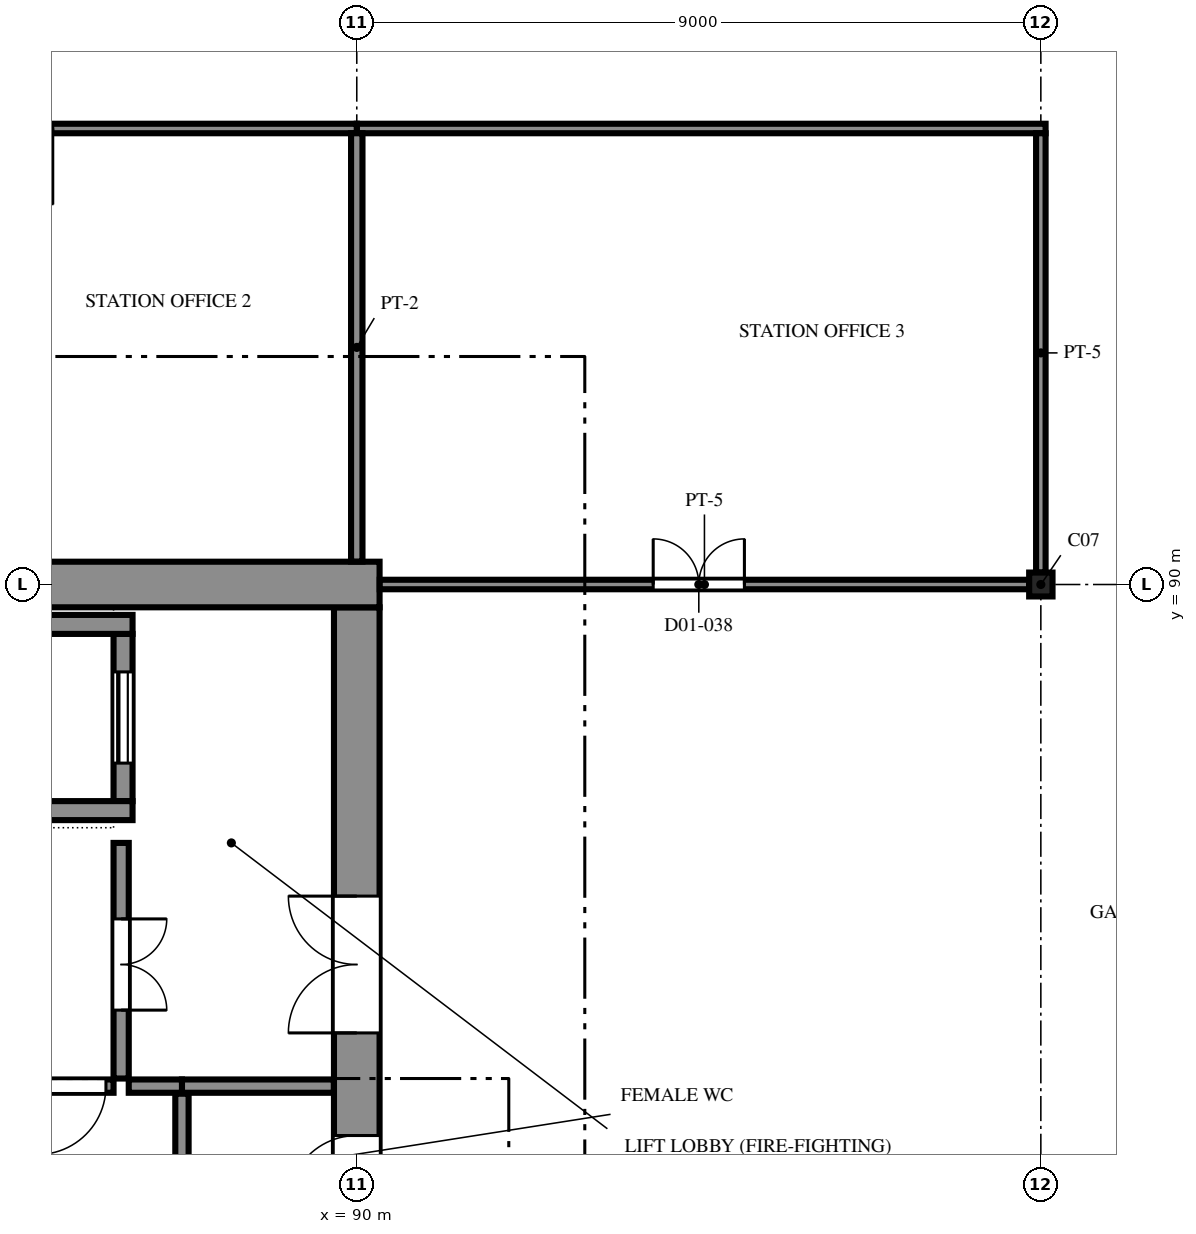
"""IFC4 building model, lengths in metres.
Left out: names, types, materials, properties, quantities, classifications, styles, units other than length and angle.
Written with IfcOpenShell. Run it as: python <this file> out.ifc"""

import sys

from ifc_helpers import new_model, si_unit, direction, frame, frame_2d, origin, origin_2d, place, context, subcontext, project, spatial, polyline, rectangle, i_section, outline, extrude, element, fill, save


model = new_model("IFC4")
c1 = context("Model", 3, precision=1e-05, world=origin(), true_north=direction((0.0, 1.0)))
c2 = subcontext(c1, "Body", "Model", "MODEL_VIEW")
j1 = project(units=[si_unit("LENGTHUNIT", "METRE"), si_unit("PLANEANGLEUNIT", "RADIAN")], contexts=[c1])
p1 = place(None, origin())
s1 = spatial("IfcSite", under=j1, at=p1, CompositionType="ELEMENT")
p2 = place(p1, origin())
s2 = spatial("IfcBuilding", under=s1, at=p2, CompositionType="ELEMENT")
p3 = place(p2, frame((0.0, 0.0, 7.5)))
s3 = spatial("IfcBuildingStorey", under=s2, at=p3, CompositionType="ELEMENT", Elevation=7.5)
p4 = place(p3, frame((99.0, 90.0, 0.0), z_axis=(0.0, 0.0, 1.0), x_axis=(1.0, 0.0, 0.0)))
e1 = element("IfcColumn", 1, at=p4, inside=s3, PredefinedType="COLUMN", context=c2, shape_type="SweptSolid", body=[
    extrude(i_section(OverallWidth=0.307, OverallDepth=0.314, WebThickness=0.012, FlangeThickness=0.019, FilletRadius=0.015, at=origin_2d()), origin(), (0.0, 0.0, 1.0), 4.2),
])
p5 = place(p3, frame((71.7, 90.0, 0.0), z_axis=(0.0, 0.0, 1.0), x_axis=(1.0, 0.0, 0.0)))
e2 = element("IfcWall", 2, at=p5, inside=s3, PredefinedType="SOLIDWALL", context=c2, shape_type="SweptSolid", body=[
    extrude(rectangle(XDim=18.6, YDim=0.6, at=frame_2d((9.3, 0.0))), origin(), (0.0, 0.0, 1.0), 4.2),
])
p6 = place(p3, frame((90.0, 81.3, 0.0), z_axis=(0.0, 0.0, 1.0), x_axis=(0.0, 1.0, 0.0)))
e3 = element("IfcWall", 3, at=p6, inside=s3, PredefinedType="SOLIDWALL", context=c2, shape_type="SweptSolid", body=[
    extrude(rectangle(XDim=8.4, YDim=0.6, at=frame_2d((4.2, 0.0))), origin(), (0.0, 0.0, 1.0), 4.2),
])
p7 = place(p6, frame((2.8, 0.0, 0.0)))
e4 = element("IfcOpeningElement", 4, at=p7, cuts=e3, PredefinedType="OPENING", context=c2, shape_type="SweptSolid", body=[
    extrude(rectangle(XDim=1.8, YDim=2.1, at=frame_2d((0.9, 1.05))), frame((0.0, 0.31, 0.0), z_axis=(0.0, -1.0, 0.0), x_axis=(1.0, 0.0, 0.0)), (0.0, 0.0, 1.0), 0.62),
])
p8 = place(p6, frame((0.55, 0.0, 0.0)))
e5 = element("IfcOpeningElement", 5, at=p8, cuts=e3, PredefinedType="OPENING", context=c2, shape_type="SweptSolid", body=[
    extrude(rectangle(XDim=0.9, YDim=2.1, at=frame_2d((0.45, 1.05))), frame((0.0, 0.31, 0.0), z_axis=(0.0, -1.0, 0.0), x_axis=(1.0, 0.0, 0.0)), (0.0, 0.0, 1.0), 0.62),
])
for number, where, z_axis, x_axis in (
    (6, (83.65, 87.025, 0.0), (0.0, 0.0, 1.0), (1.0, 0.0, 0.0)),
    (7, (83.65, 89.475, 0.0), (0.0, 0.0, 1.0), (1.0, 0.0, 0.0)),
):
    element("IfcWall", number, at=place(p3, frame(where, z_axis=z_axis, x_axis=x_axis)), inside=s3, PredefinedType="SOLIDWALL", context=c2, shape_type="SweptSolid", body=[
        extrude(rectangle(XDim=3.4, YDim=0.25, at=frame_2d((1.7, 0.0))), origin(), (0.0, 0.0, 1.0), 3.516),
    ])
p9 = place(p3, frame((86.925, 87.15, 0.0), z_axis=(0.0, 0.0, 1.0), x_axis=(0.0, 1.0, 0.0)))
e8 = element("IfcWall", 8, at=p9, inside=s3, PredefinedType="SOLIDWALL", context=c2, shape_type="SweptSolid", body=[
    extrude(rectangle(XDim=2.2, YDim=0.25, at=frame_2d((1.1, 0.0))), origin(), (0.0, 0.0, 1.0), 3.516),
])
p10 = place(p9, frame((0.5, 0.0, 0.0)))
e9 = element("IfcOpeningElement", 9, at=p10, cuts=e8, PredefinedType="OPENING", context=c2, shape_type="SweptSolid", body=[
    extrude(rectangle(XDim=1.2, YDim=2.1, at=frame_2d((0.6, 1.05))), frame((0.0, 0.135, 0.0), z_axis=(0.0, -1.0, 0.0), x_axis=(1.0, 0.0, 0.0)), (0.0, 0.0, 1.0), 0.27),
])
p11 = place(p3, frame((99.062, 96.0, 0.0), z_axis=(0.0, 0.0, 1.0), x_axis=(-1.0, 0.0, 0.0)))
e10 = element("IfcWall", 10, at=p11, inside=s3, PredefinedType="PARTITIONING", context=c2, shape_type="SweptSolid", body=[
    extrude(rectangle(XDim=9.062, YDim=0.125, at=frame_2d((4.531, 0.0))), origin(), (0.0, 0.0, 1.0), 3.307),
])
p12 = place(p3, frame((90.0, 96.0, 0.0), z_axis=(0.0, 0.0, 1.0), x_axis=(-1.0, 0.0, 0.0)))
e11 = element("IfcWall", 11, at=p12, inside=s3, PredefinedType="PARTITIONING", context=c2, shape_type="SweptSolid", body=[
    extrude(rectangle(XDim=9.0, YDim=0.125, at=frame_2d((4.5, 0.0))), origin(), (0.0, 0.0, 1.0), 3.307),
])
p13 = place(p12, frame((4.0, 0.0, 0.0)))
e12 = element("IfcOpeningElement", 12, at=p13, cuts=e11, PredefinedType="OPENING", context=c2, shape_type="SweptSolid", body=[
    extrude(rectangle(XDim=1.0, YDim=2.1, at=frame_2d((0.5, 1.05))), frame((0.0, 0.073, 0.0), z_axis=(0.0, -1.0, 0.0), x_axis=(1.0, 0.0, 0.0)), (0.0, 0.0, 1.0), 0.145),
])
p14 = place(p3, frame((90.302, 90.0, 0.0), z_axis=(0.0, 0.0, 1.0), x_axis=(1.0, 0.0, 0.0)))
e13 = element("IfcWall", 13, at=p14, inside=s3, PredefinedType="PARTITIONING", context=c2, shape_type="SweptSolid", body=[
    extrude(rectangle(XDim=8.544, YDim=0.125, at=frame_2d((4.272, 0.0))), origin(), (0.0, 0.0, 1.0), 3.307),
])
p15 = place(p14, frame((3.598, 0.0, 0.0)))
e14 = element("IfcOpeningElement", 14, at=p15, cuts=e13, PredefinedType="OPENING", context=c2, shape_type="SweptSolid", body=[
    extrude(rectangle(XDim=1.2, YDim=2.1, at=frame_2d((0.6, 1.05))), frame((0.0, 0.073, 0.0), z_axis=(0.0, -1.0, 0.0), x_axis=(1.0, 0.0, 0.0)), (0.0, 0.0, 1.0), 0.145),
])
p16 = place(p3, frame((99.0, 90.157, 0.0), z_axis=(0.0, 0.0, 1.0), x_axis=(0.0, 1.0, 0.0)))
e15 = element("IfcWall", 15, at=p16, inside=s3, PredefinedType="PARTITIONING", context=c2, shape_type="SweptSolid", body=[
    extrude(rectangle(XDim=5.78, YDim=0.125, at=frame_2d((2.89, 0.0))), origin(), (0.0, 0.0, 1.0), 3.307),
])
p17 = place(p3, frame((90.0, 95.938, 0.0), z_axis=(0.0, 0.0, 1.0), x_axis=(0.0, -1.0, 0.0)))
e16 = element("IfcWall", 16, at=p17, inside=s3, PredefinedType="PARTITIONING", context=c2, shape_type="SweptSolid", body=[
    extrude(rectangle(XDim=5.635, YDim=0.15, at=frame_2d((2.818, 0.0))), origin(), (0.0, 0.0, 1.0), 3.307),
])
p18 = place(p3, frame((86.8, 83.4, 0.0), z_axis=(0.0, 0.0, 1.0), x_axis=(-1.0, 0.0, 0.0)))
e17 = element("IfcWall", 17, at=p18, inside=s3, PredefinedType="PARTITIONING", context=c2, shape_type="SweptSolid", body=[
    extrude(rectangle(XDim=1.1, YDim=0.175, at=frame_2d((0.55, 0.0))), origin(), (0.0, 0.0, 1.0), 3.307),
])
p19 = place(p18, frame((0.1, 0.0, 0.0)))
e18 = element("IfcOpeningElement", 18, at=p19, cuts=e17, PredefinedType="OPENING", context=c2, shape_type="SweptSolid", body=[
    extrude(rectangle(XDim=0.9, YDim=2.1, at=frame_2d((0.45, 1.05))), frame((0.0, 0.097, 0.0), z_axis=(0.0, -1.0, 0.0), x_axis=(1.0, 0.0, 0.0)), (0.0, 0.0, 1.0), 0.195),
])
p20 = place(p3, frame((86.9, 86.6, 0.0), z_axis=(0.0, 0.0, 1.0), x_axis=(0.0, -1.0, 0.0)))
e19 = element("IfcWall", 19, at=p20, inside=s3, PredefinedType="PARTITIONING", context=c2, shape_type="SweptSolid", body=[
    extrude(rectangle(XDim=3.1, YDim=0.2, at=frame_2d((1.55, 0.0))), origin(), (0.0, 0.0, 1.0), 3.382),
])
p21 = place(p20, frame((1.0, 0.0, 0.0)))
e20 = element("IfcOpeningElement", 20, at=p21, cuts=e19, PredefinedType="OPENING", context=c2, shape_type="SweptSolid", body=[
    extrude(rectangle(XDim=1.2, YDim=2.1, at=frame_2d((0.6, 1.05))), frame((0.0, 0.11, 0.0), z_axis=(0.0, -1.0, 0.0), x_axis=(1.0, 0.0, 0.0)), (0.0, 0.0, 1.0), 0.22),
])
p22 = place(p3, frame((89.698, 83.4, 0.0), z_axis=(0.0, 0.0, 1.0), x_axis=(-1.0, 0.0, 0.0)))
e21 = element("IfcWall", 21, at=p22, inside=s3, PredefinedType="PARTITIONING", context=c2, shape_type="SweptSolid", body=[
    extrude(rectangle(XDim=1.998, YDim=0.175, at=frame_2d((0.999, 0.0))), origin(), (0.0, 0.0, 1.0), 3.307),
])
p23 = place(p3, frame((87.7, 83.4, 0.0), z_axis=(0.0, 0.0, 1.0), x_axis=(-1.0, 0.0, 0.0)))
e22 = element("IfcWall", 22, at=p23, inside=s3, PredefinedType="PARTITIONING", context=c2, shape_type="SweptSolid", body=[
    extrude(rectangle(XDim=0.7, YDim=0.175, at=frame_2d((0.35, 0.0))), origin(), (0.0, 0.0, 1.0), 3.307),
])
p24 = place(p3, frame((87.7, 83.3, 0.0), z_axis=(0.0, 0.0, 1.0), x_axis=(0.0, -1.0, 0.0)))
e23 = element("IfcWall", 23, at=p24, inside=s3, PredefinedType="PARTITIONING", context=c2, shape_type="SweptSolid", body=[
    extrude(rectangle(XDim=1.998, YDim=0.175, at=frame_2d((0.999, 0.0))), origin(), (0.0, 0.0, 1.0), 3.307),
])
p25 = place(p10, origin())
e24 = element("IfcDoor", 24, at=p25, inside=s3, OperationType="SLIDING_TO_LEFT", PredefinedType="DOOR", context=c2, shape_type="SweptSolid", body=[
    extrude(outline(polyline([(0.0, 0.0), (0.07, 0.0), (0.07, 2.03), (1.13, 2.03), (1.13, 0.0), (1.2, 0.0), (1.2, 2.1), (0.0, 2.1), (0.0, 0.0)])), frame((0.0, 0.025, 0.0), z_axis=(0.0, -1.0, 0.0), x_axis=(1.0, 0.0, 0.0)), (0.0, 0.0, 1.0), 0.05),
    extrude(rectangle(XDim=0.579, YDim=2.016, at=frame_2d((0.363, 1.018))), frame((0.0, 0.018, 0.0), z_axis=(0.0, -1.0, 0.0), x_axis=(1.0, 0.0, 0.0)), (0.0, 0.0, 1.0), 0.016),
    extrude(rectangle(XDim=0.575, YDim=2.016, at=frame_2d((0.839, 1.018))), frame((0.0, -0.002, 0.0), z_axis=(0.0, -1.0, 0.0), x_axis=(1.0, 0.0, 0.0)), (0.0, 0.0, 1.0), 0.016),
])
fill(e9, e24)
p26 = place(p15, origin())
e25 = element("IfcDoor", 25, at=p26, inside=s3, OperationType="DOUBLE_DOOR_SINGLE_SWING", PredefinedType="DOOR", context=c2, shape_type="SweptSolid", body=[
    extrude(outline(polyline([(0.0, 0.0), (0.07, 0.0), (0.07, 2.03), (1.13, 2.03), (1.13, 0.0), (1.2, 0.0), (1.2, 2.1), (0.0, 2.1), (0.0, 0.0)])), frame((0.0, 0.025, 0.0), z_axis=(0.0, -1.0, 0.0), x_axis=(1.0, 0.0, 0.0)), (0.0, 0.0, 1.0), 0.05),
    extrude(outline(polyline([(0.074, 0.01), (0.597, 0.01), (0.597, 2.026), (0.074, 2.026), (0.074, 0.01)]), holes=[polyline([(0.178, 0.373), (0.492, 0.373), (0.492, 1.784), (0.178, 1.784), (0.178, 0.373)])]), frame((0.0, 0.017, 0.0), z_axis=(0.0, -1.0, 0.0), x_axis=(1.0, 0.0, 0.0)), (0.0, 0.0, 1.0), 0.035),
    extrude(rectangle(XDim=0.314, YDim=1.411, at=frame_2d((0.335, 1.079))), frame((0.0, 0.009, 0.0), z_axis=(0.0, -1.0, 0.0), x_axis=(1.0, 0.0, 0.0)), (0.0, 0.0, 1.0), 0.017),
    extrude(outline(polyline([(0.603, 0.01), (1.126, 0.01), (1.126, 2.026), (0.603, 2.026), (0.603, 0.01)]), holes=[polyline([(0.708, 0.373), (1.021, 0.373), (1.021, 1.784), (0.708, 1.784), (0.708, 0.373)])]), frame((0.0, 0.017, 0.0), z_axis=(0.0, -1.0, 0.0), x_axis=(1.0, 0.0, 0.0)), (0.0, 0.0, 1.0), 0.035),
    extrude(rectangle(XDim=0.314, YDim=1.411, at=frame_2d((0.865, 1.079))), frame((0.0, 0.009, 0.0), z_axis=(0.0, -1.0, 0.0), x_axis=(1.0, 0.0, 0.0)), (0.0, 0.0, 1.0), 0.017),
])
fill(e14, e25)
p27 = place(p21, origin())
e26 = element("IfcDoor", 26, at=p27, inside=s3, OperationType="DOUBLE_DOOR_SINGLE_SWING", PredefinedType="DOOR", context=c2, shape_type="SweptSolid", body=[
    extrude(outline(polyline([(0.0, 0.0), (0.07, 0.0), (0.07, 2.03), (1.13, 2.03), (1.13, 0.0), (1.2, 0.0), (1.2, 2.1), (0.0, 2.1), (0.0, 0.0)])), frame((0.0, 0.025, 0.0), z_axis=(0.0, -1.0, 0.0), x_axis=(1.0, 0.0, 0.0)), (0.0, 0.0, 1.0), 0.05),
    extrude(outline(polyline([(0.074, 0.01), (0.597, 0.01), (0.597, 2.026), (0.074, 2.026), (0.074, 0.01)]), holes=[polyline([(0.178, 0.373), (0.492, 0.373), (0.492, 1.784), (0.178, 1.784), (0.178, 0.373)])]), frame((0.0, 0.017, 0.0), z_axis=(0.0, -1.0, 0.0), x_axis=(1.0, 0.0, 0.0)), (0.0, 0.0, 1.0), 0.035),
    extrude(rectangle(XDim=0.314, YDim=1.411, at=frame_2d((0.335, 1.079))), frame((0.0, 0.009, 0.0), z_axis=(0.0, -1.0, 0.0), x_axis=(1.0, 0.0, 0.0)), (0.0, 0.0, 1.0), 0.017),
    extrude(outline(polyline([(0.603, 0.01), (1.126, 0.01), (1.126, 2.026), (0.603, 2.026), (0.603, 0.01)]), holes=[polyline([(0.708, 0.373), (1.021, 0.373), (1.021, 1.784), (0.708, 1.784), (0.708, 0.373)])]), frame((0.0, 0.017, 0.0), z_axis=(0.0, -1.0, 0.0), x_axis=(1.0, 0.0, 0.0)), (0.0, 0.0, 1.0), 0.035),
    extrude(rectangle(XDim=0.314, YDim=1.411, at=frame_2d((0.865, 1.079))), frame((0.0, 0.009, 0.0), z_axis=(0.0, -1.0, 0.0), x_axis=(1.0, 0.0, 0.0)), (0.0, 0.0, 1.0), 0.017),
])
fill(e20, e26)
p28 = place(p7, origin())
e27 = element("IfcDoor", 27, at=p28, inside=s3, OperationType="DOUBLE_DOOR_SINGLE_SWING", PredefinedType="DOOR", context=c2, shape_type="SweptSolid", body=[
    extrude(outline(polyline([(0.0, 0.0), (0.07, 0.0), (0.07, 2.03), (1.73, 2.03), (1.73, 0.0), (1.8, 0.0), (1.8, 2.1), (0.0, 2.1), (0.0, 0.0)])), frame((0.0, 0.025, 0.0), z_axis=(0.0, -1.0, 0.0), x_axis=(1.0, 0.0, 0.0)), (0.0, 0.0, 1.0), 0.05),
    extrude(outline(polyline([(0.074, 0.01), (0.897, 0.01), (0.897, 2.026), (0.074, 2.026), (0.074, 0.01)]), holes=[polyline([(0.194, 0.16), (0.777, 0.16), (0.777, 1.01), (0.194, 1.01), (0.194, 0.16)]), polyline([(0.335, 1.16), (0.635, 1.16), (0.635, 1.76), (0.335, 1.76), (0.335, 1.16)])]), frame((0.0, 0.017, 0.0), z_axis=(0.0, -1.0, 0.0), x_axis=(1.0, 0.0, 0.0)), (0.0, 0.0, 1.0), 0.035),
    extrude(rectangle(XDim=0.583, YDim=0.85, at=frame_2d((0.485, 0.585))), frame((0.0, 0.009, 0.0), z_axis=(0.0, -1.0, 0.0), x_axis=(1.0, 0.0, 0.0)), (0.0, 0.0, 1.0), 0.017),
    extrude(rectangle(XDim=0.3, YDim=0.6, at=frame_2d((0.485, 1.46))), frame((0.0, 0.006, 0.0), z_axis=(0.0, -1.0, 0.0), x_axis=(1.0, 0.0, 0.0)), (0.0, 0.0, 1.0), 0.012),
    extrude(outline(polyline([(0.903, 0.01), (1.726, 0.01), (1.726, 2.026), (0.903, 2.026), (0.903, 0.01)]), holes=[polyline([(1.023, 0.16), (1.606, 0.16), (1.606, 1.01), (1.023, 1.01), (1.023, 0.16)]), polyline([(1.165, 1.16), (1.465, 1.16), (1.465, 1.76), (1.165, 1.76), (1.165, 1.16)])]), frame((0.0, 0.017, 0.0), z_axis=(0.0, -1.0, 0.0), x_axis=(1.0, 0.0, 0.0)), (0.0, 0.0, 1.0), 0.035),
    extrude(rectangle(XDim=0.583, YDim=0.85, at=frame_2d((1.314, 0.585))), frame((0.0, 0.009, 0.0), z_axis=(0.0, -1.0, 0.0), x_axis=(1.0, 0.0, 0.0)), (0.0, 0.0, 1.0), 0.017),
    extrude(rectangle(XDim=0.3, YDim=0.6, at=frame_2d((1.314, 1.46))), frame((0.0, 0.006, 0.0), z_axis=(0.0, -1.0, 0.0), x_axis=(1.0, 0.0, 0.0)), (0.0, 0.0, 1.0), 0.012),
])
fill(e4, e27)
p29 = place(p19, origin())
e28 = element("IfcDoor", 28, at=p29, inside=s3, OperationType="SINGLE_SWING_RIGHT", PredefinedType="DOOR", context=c2, shape_type="SweptSolid", body=[
    extrude(outline(polyline([(0.0, 0.0), (0.07, 0.0), (0.07, 2.03), (0.83, 2.03), (0.83, 0.0), (0.9, 0.0), (0.9, 2.1), (0.0, 2.1), (0.0, 0.0)])), frame((0.0, 0.025, 0.0), z_axis=(0.0, -1.0, 0.0), x_axis=(1.0, 0.0, 0.0)), (0.0, 0.0, 1.0), 0.05),
    extrude(outline(polyline([(0.074, 0.01), (0.826, 0.01), (0.826, 2.026), (0.074, 2.026), (0.074, 0.01)]), holes=[polyline([(0.194, 0.16), (0.706, 0.16), (0.706, 1.01), (0.194, 1.01), (0.194, 0.16)]), polyline([(0.3, 1.16), (0.6, 1.16), (0.6, 1.76), (0.3, 1.76), (0.3, 1.16)])]), frame((0.0, 0.017, 0.0), z_axis=(0.0, -1.0, 0.0), x_axis=(1.0, 0.0, 0.0)), (0.0, 0.0, 1.0), 0.035),
    extrude(rectangle(XDim=0.512, YDim=0.85, at=frame_2d((0.45, 0.585))), frame((0.0, 0.009, 0.0), z_axis=(0.0, -1.0, 0.0), x_axis=(1.0, 0.0, 0.0)), (0.0, 0.0, 1.0), 0.017),
    extrude(rectangle(XDim=0.3, YDim=0.6, at=frame_2d((0.45, 1.46))), frame((0.0, 0.006, 0.0), z_axis=(0.0, -1.0, 0.0), x_axis=(1.0, 0.0, 0.0)), (0.0, 0.0, 1.0), 0.012),
])
fill(e18, e28)
p30 = place(p8, origin())
e29 = element("IfcDoor", 29, at=p30, inside=s3, OperationType="SINGLE_SWING_LEFT", PredefinedType="DOOR", context=c2, shape_type="SweptSolid", body=[
    extrude(outline(polyline([(0.0, 0.0), (0.07, 0.0), (0.07, 2.03), (0.83, 2.03), (0.83, 0.0), (0.9, 0.0), (0.9, 2.1), (0.0, 2.1), (0.0, 0.0)])), frame((0.0, 0.025, 0.0), z_axis=(0.0, -1.0, 0.0), x_axis=(1.0, 0.0, 0.0)), (0.0, 0.0, 1.0), 0.05),
    extrude(outline(polyline([(0.074, 0.01), (0.826, 0.01), (0.826, 2.026), (0.074, 2.026), (0.074, 0.01)]), holes=[polyline([(0.194, 0.16), (0.706, 0.16), (0.706, 1.01), (0.194, 1.01), (0.194, 0.16)]), polyline([(0.3, 1.16), (0.6, 1.16), (0.6, 1.76), (0.3, 1.76), (0.3, 1.16)])]), frame((0.0, 0.017, 0.0), z_axis=(0.0, -1.0, 0.0), x_axis=(1.0, 0.0, 0.0)), (0.0, 0.0, 1.0), 0.035),
    extrude(rectangle(XDim=0.512, YDim=0.85, at=frame_2d((0.45, 0.585))), frame((0.0, 0.009, 0.0), z_axis=(0.0, -1.0, 0.0), x_axis=(1.0, 0.0, 0.0)), (0.0, 0.0, 1.0), 0.017),
    extrude(rectangle(XDim=0.3, YDim=0.6, at=frame_2d((0.45, 1.46))), frame((0.0, 0.006, 0.0), z_axis=(0.0, -1.0, 0.0), x_axis=(1.0, 0.0, 0.0)), (0.0, 0.0, 1.0), 0.012),
])
fill(e5, e29)
save(model, sys.argv[1])
